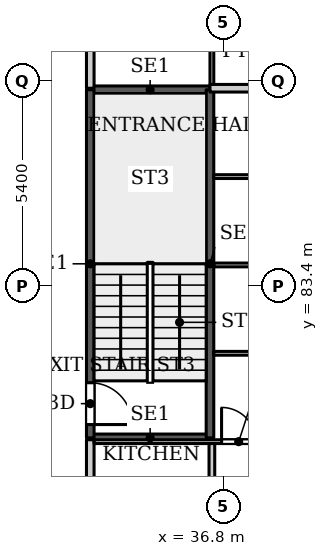
"""IFC4 building model, lengths in metres.
Left out: names, types, materials, properties, quantities, classifications, styles, units other than length and angle.
Written with IfcOpenShell. Run it as: python <this file> out.ifc"""

import sys

from ifc_helpers import new_model, si_unit, direction, frame, frame_2d, origin, place, context, subcontext, project, spatial, rectangle, extrude, source, transform, mapped, element, fill, save


model = new_model("IFC4")
c1 = context("Model", 3, precision=1e-05, world=origin(), true_north=direction((0.0, 1.0)))
c2 = subcontext(c1, "Body", "Model", "MODEL_VIEW")
j1 = project(units=[si_unit("LENGTHUNIT", "METRE"), si_unit("PLANEANGLEUNIT", "RADIAN")], contexts=[c1])
p1 = place(None, origin())
s1 = spatial("IfcSite", under=j1, at=p1, CompositionType="ELEMENT")
p2 = place(p1, origin())
s2 = spatial("IfcBuilding", under=s1, at=p2, CompositionType="ELEMENT")
p3 = place(p2, frame((0.0, 0.0, 61.7)))
s3 = spatial("IfcBuildingStorey", under=s2, at=p3, CompositionType="ELEMENT", Elevation=61.7)
for number, where, z_axis, x_axis in (
    (1, (33.3, 79.4, 0.0), (0.0, 0.0, 1.0), (1.0, 0.0, 0.0)),
    (2, (33.3, 88.56, 0.0), (0.0, 0.0, 1.0), (1.0, 0.0, 0.0)),
):
    element("IfcWall", number, at=place(p3, frame(where, z_axis=z_axis, x_axis=x_axis)), inside=s3, PredefinedType="SHEAR", context=c2, shape_type="SweptSolid", body=[
        extrude(rectangle(XDim=3.15, YDim=0.2, at=frame_2d((1.575, 0.0))), origin(), (0.0, 0.0, 1.0), 3.9),
    ])
p4 = place(p3, frame((33.3, 79.4, 0.0), z_axis=(0.0, 0.0, 1.0), x_axis=(0.0, 1.0, 0.0)))
e3 = element("IfcWall", 3, at=p4, inside=s3, PredefinedType="SHEAR", context=c2, shape_type="SweptSolid", body=[
    extrude(rectangle(XDim=9.16, YDim=0.2, at=frame_2d((4.58, 0.0))), origin(), (0.0, 0.0, 1.0), 3.9),
])
p5 = place(p4, frame((0.35, 0.0, 0.0)))
e4 = element("IfcOpeningElement", 4, at=p5, cuts=e3, PredefinedType="OPENING", context=c2, shape_type="SweptSolid", body=[
    extrude(rectangle(XDim=1.1, YDim=2.2, at=frame_2d((0.55, 1.1))), frame((0.0, 0.11, 0.0), z_axis=(0.0, -1.0, 0.0), x_axis=(1.0, 0.0, 0.0)), (0.0, 0.0, 1.0), 0.22),
])
p6 = place(p3, frame((36.45, 79.4, 0.0), z_axis=(0.0, 0.0, 1.0), x_axis=(0.0, 1.0, 0.0)))
e5 = element("IfcWall", 5, at=p6, inside=s3, PredefinedType="SHEAR", context=c2, shape_type="SweptSolid", body=[
    extrude(rectangle(XDim=9.16, YDim=0.2, at=frame_2d((4.58, 0.0))), origin(), (0.0, 0.0, 1.0), 3.9),
])
p7 = place(p3, frame((33.3, 54.4, 0.0), z_axis=(0.0, 0.0, 1.0), x_axis=(0.0, 1.0, 0.0)))
e6 = element("IfcWall", 6, at=p7, inside=s3, PredefinedType="PARTITIONING", context=c2, shape_type="SweptSolid", body=[
    extrude(rectangle(XDim=24.95, YDim=0.2, at=frame_2d((12.475, 0.0))), origin(), (0.0, 0.0, 1.0), 3.6),
])
p8 = place(p7, frame((3.4, 0.0, 0.0)))
e7 = element("IfcOpeningElement", 7, at=p8, cuts=e6, PredefinedType="OPENING", context=c2, shape_type="SweptSolid", body=[
    extrude(rectangle(XDim=1.0, YDim=2.1, at=frame_2d((0.5, 1.05))), frame((0.0, 0.11, 0.0), z_axis=(0.0, -1.0, 0.0), x_axis=(1.0, 0.0, 0.0)), (0.0, 0.0, 1.0), 0.22),
])
p9 = place(p3, frame((33.3, 88.6, 0.0), z_axis=(0.0, 0.0, 1.0), x_axis=(0.0, 1.0, 0.0)))
e8 = element("IfcWall", 8, at=p9, inside=s3, PredefinedType="PARTITIONING", context=c2, shape_type="SweptSolid", body=[
    extrude(rectangle(XDim=5.175, YDim=0.2, at=frame_2d((2.587, 0.0))), origin(), (0.0, 0.0, 1.0), 3.6),
])
p10 = place(p9, frame((3.7, 0.0, 0.0)))
e9 = element("IfcOpeningElement", 9, at=p10, cuts=e8, PredefinedType="OPENING", context=c2, shape_type="SweptSolid", body=[
    extrude(rectangle(XDim=1.0, YDim=2.1, at=frame_2d((0.5, 1.05))), frame((0.0, 0.11, 0.0), z_axis=(0.0, -1.0, 0.0), x_axis=(1.0, 0.0, 0.0)), (0.0, 0.0, 1.0), 0.22),
])
p11 = place(p3, frame((33.4, 79.3, 0.0), z_axis=(0.0, 0.0, 1.0), x_axis=(1.0, 0.0, 0.0)))
e10 = element("IfcWall", 10, at=p11, inside=s3, PredefinedType="PARTITIONING", context=c2, shape_type="SweptSolid", body=[
    extrude(rectangle(XDim=12.5, YDim=0.1, at=frame_2d((6.25, 0.0))), origin(), (0.0, 0.0, 1.0), 3.6),
])
p12 = place(p11, frame((3.355, 0.0, 0.0)))
e11 = element("IfcOpeningElement", 11, at=p12, cuts=e10, PredefinedType="OPENING", context=c2, shape_type="SweptSolid", body=[
    extrude(rectangle(XDim=0.9, YDim=2.1, at=frame_2d((0.45, 1.05))), frame((0.0, 0.06, 0.0), z_axis=(0.0, -1.0, 0.0), x_axis=(1.0, 0.0, 0.0)), (0.0, 0.0, 1.0), 0.12),
])
p13 = place(p3, frame((36.45, 88.6, 0.0), z_axis=(0.0, 0.0, 1.0), x_axis=(1.0, 0.0, 0.0)))
e12 = element("IfcWall", 12, at=p13, inside=s3, PredefinedType="PARTITIONING", context=c2, shape_type="SweptSolid", body=[
    extrude(rectangle(XDim=9.45, YDim=0.2, at=frame_2d((4.725, 0.0))), origin(), (0.0, 0.0, 1.0), 3.147),
])
p14 = place(p3, frame((36.5, 60.325, 0.0), z_axis=(0.0, 0.0, 1.0), x_axis=(0.0, 1.0, 0.0)))
e13 = element("IfcWall", 13, at=p14, inside=s3, PredefinedType="PARTITIONING", context=c2, shape_type="SweptSolid", body=[
    extrude(rectangle(XDim=18.925, YDim=0.15, at=frame_2d((9.462, 0.0))), origin(), (0.0, 0.0, 1.0), 3.6),
])
p15 = place(p14, frame((8.075, 0.0, 0.0)))
e14 = element("IfcOpeningElement", 14, at=p15, cuts=e13, PredefinedType="OPENING", context=c2, shape_type="SweptSolid", body=[
    extrude(rectangle(XDim=0.8, YDim=2.1, at=frame_2d((0.4, 1.05))), frame((0.0, 0.085, 0.0), z_axis=(0.0, -1.0, 0.0), x_axis=(1.0, 0.0, 0.0)), (0.0, 0.0, 1.0), 0.17),
])
p16 = place(p14, frame((15.425, 0.0, 0.0)))
e15 = element("IfcOpeningElement", 15, at=p16, cuts=e13, PredefinedType="OPENING", context=c2, shape_type="SweptSolid", body=[
    extrude(rectangle(XDim=0.9, YDim=2.1, at=frame_2d((0.45, 1.05))), frame((0.0, 0.085, 0.0), z_axis=(0.0, -1.0, 0.0), x_axis=(1.0, 0.0, 0.0)), (0.0, 0.0, 1.0), 0.17),
])
p17 = place(p14, frame((12.275, 0.0, 0.0)))
e16 = element("IfcOpeningElement", 16, at=p17, cuts=e13, PredefinedType="OPENING", context=c2, shape_type="SweptSolid", body=[
    extrude(rectangle(XDim=0.8, YDim=2.1, at=frame_2d((0.4, 1.05))), frame((0.0, 0.085, 0.0), z_axis=(0.0, -1.0, 0.0), x_axis=(1.0, 0.0, 0.0)), (0.0, 0.0, 1.0), 0.17),
])
p18 = place(p14, frame((1.675, 0.0, 0.0)))
e17 = element("IfcOpeningElement", 17, at=p18, cuts=e13, PredefinedType="OPENING", context=c2, shape_type="SweptSolid", body=[
    extrude(rectangle(XDim=0.8, YDim=2.1, at=frame_2d((0.4, 1.05))), frame((0.0, 0.085, 0.0), z_axis=(0.0, -1.0, 0.0), x_axis=(1.0, 0.0, 0.0)), (0.0, 0.0, 1.0), 0.17),
])
p19 = place(p3, frame((36.5, 88.7, 0.0), z_axis=(0.0, 0.0, 1.0), x_axis=(0.0, 1.0, 0.0)))
e18 = element("IfcWall", 18, at=p19, inside=s3, PredefinedType="PARTITIONING", context=c2, shape_type="SweptSolid", body=[
    extrude(rectangle(XDim=3.25, YDim=0.1, at=frame_2d((1.625, 0.0))), origin(), (0.0, 0.0, 1.0), 3.6),
])
p20 = place(p19, frame((1.1, 0.0, 0.0)))
e19 = element("IfcOpeningElement", 19, at=p20, cuts=e18, PredefinedType="OPENING", context=c2, shape_type="SweptSolid", body=[
    extrude(rectangle(XDim=0.9, YDim=2.1, at=frame_2d((0.45, 1.05))), frame((0.0, 0.06, 0.0), z_axis=(0.0, -1.0, 0.0), x_axis=(1.0, 0.0, 0.0)), (0.0, 0.0, 1.0), 0.12),
])
p21 = place(p3, frame((36.549, 81.625, 0.0), z_axis=(0.0, 0.0, 1.0), x_axis=(1.0, 0.0, 0.0)))
e20 = element("IfcWall", 20, at=p21, inside=s3, PredefinedType="PARTITIONING", context=c2, shape_type="SweptSolid", body=[
    extrude(rectangle(XDim=9.351, YDim=0.1, at=frame_2d((4.675, 0.0))), origin(), (0.0, 0.0, 1.0), 3.6),
])
p22 = place(p21, frame((4.176, 0.0, 0.0)))
e21 = element("IfcOpeningElement", 21, at=p22, cuts=e20, PredefinedType="OPENING", context=c2, shape_type="SweptSolid", body=[
    extrude(rectangle(XDim=0.9, YDim=2.1, at=frame_2d((0.45, 1.05))), frame((0.0, 0.06, 0.0), z_axis=(0.0, -1.0, 0.0), x_axis=(1.0, 0.0, 0.0)), (0.0, 0.0, 1.0), 0.12),
])
p23 = place(p3, frame((36.549, 83.95, 0.0), z_axis=(0.0, 0.0, 1.0), x_axis=(1.0, 0.0, 0.0)))
e22 = element("IfcWall", 22, at=p23, inside=s3, PredefinedType="PARTITIONING", context=c2, shape_type="SweptSolid", body=[
    extrude(rectangle(XDim=9.351, YDim=0.1, at=frame_2d((4.675, 0.0))), origin(), (0.0, 0.0, 1.0), 3.6),
])
p24 = place(p23, frame((4.176, 0.0, 0.0)))
e23 = element("IfcOpeningElement", 23, at=p24, cuts=e22, PredefinedType="OPENING", context=c2, shape_type="SweptSolid", body=[
    extrude(rectangle(XDim=0.9, YDim=2.1, at=frame_2d((0.45, 1.05))), frame((0.0, 0.06, 0.0), z_axis=(0.0, -1.0, 0.0), x_axis=(1.0, 0.0, 0.0)), (0.0, 0.0, 1.0), 0.12),
])
p25 = place(p3, frame((36.549, 86.275, 0.0), z_axis=(0.0, 0.0, 1.0), x_axis=(1.0, 0.0, 0.0)))
e24 = element("IfcWall", 24, at=p25, inside=s3, PredefinedType="PARTITIONING", context=c2, shape_type="SweptSolid", body=[
    extrude(rectangle(XDim=9.351, YDim=0.1, at=frame_2d((4.675, 0.0))), origin(), (0.0, 0.0, 1.0), 3.6),
])
p26 = place(p25, frame((4.176, 0.0, 0.0)))
e25 = element("IfcOpeningElement", 25, at=p26, cuts=e24, PredefinedType="OPENING", context=c2, shape_type="SweptSolid", body=[
    extrude(rectangle(XDim=0.9, YDim=2.1, at=frame_2d((0.45, 1.05))), frame((0.0, 0.06, 0.0), z_axis=(0.0, -1.0, 0.0), x_axis=(1.0, 0.0, 0.0)), (0.0, 0.0, 1.0), 0.12),
])
m1 = source(origin(), c2, "Body", "SweptSolid", [
    extrude(rectangle(XDim=1.1, YDim=2.2, at=frame_2d((0.55, 1.1))), frame((0.0, 0.025, 0.0), z_axis=(0.0, -1.0, 0.0), x_axis=(1.0, 0.0, 0.0)), (0.0, 0.0, 1.0), 0.05),
])
p27 = place(p5, origin())
e26 = element("IfcDoor", 26, at=p27, inside=s3, OperationType="SINGLE_SWING_RIGHT", PredefinedType="DOOR", context=c2, shape_type="MappedRepresentation", body=[
    mapped(m1, transform((0.0, 0.0, 0.0), x_axis=(1.0, 0.0, 0.0), y_axis=(0.0, 1.0, 0.0), z_axis=(0.0, 0.0, 1.0), scale=1.0)),
])
fill(e4, e26)
m2 = source(origin(), c2, "Body", "SweptSolid", [
    extrude(rectangle(XDim=0.9, YDim=2.1, at=frame_2d((0.45, 1.05))), frame((0.0, 0.025, 0.0), z_axis=(0.0, -1.0, 0.0), x_axis=(1.0, 0.0, 0.0)), (0.0, 0.0, 1.0), 0.05),
])
p28 = place(p12, origin())
e27 = element("IfcDoor", 27, at=p28, inside=s3, OperationType="SINGLE_SWING_LEFT", PredefinedType="DOOR", context=c2, shape_type="MappedRepresentation", body=[
    mapped(m2, transform((0.0, 0.0, 0.0), x_axis=(1.0, 0.0, 0.0), y_axis=(0.0, 1.0, 0.0), z_axis=(0.0, 0.0, 1.0), scale=1.0)),
])
fill(e11, e27)
save(model, sys.argv[1])
